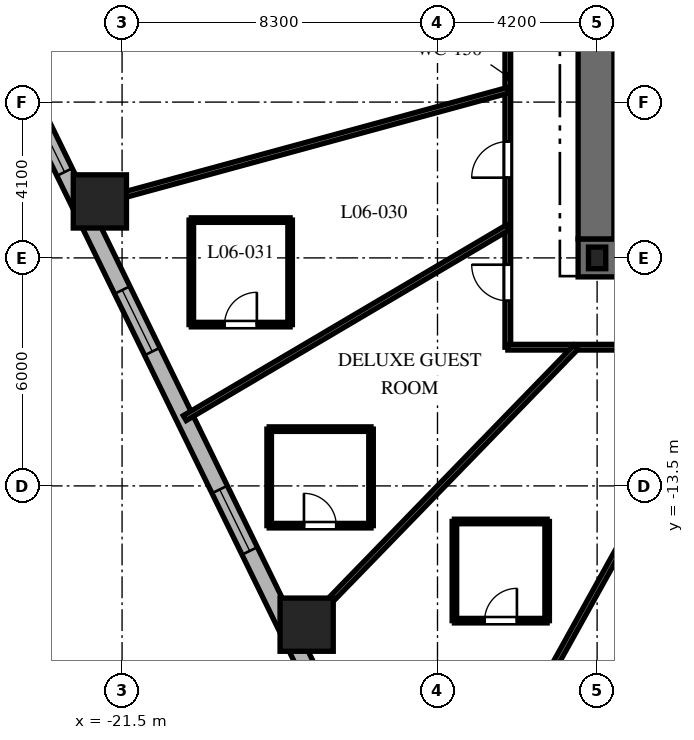
"""IFC4 building model, lengths in metres.
Left out: names, types, materials, properties, quantities, classifications, styles, units other than length and angle.
Written with IfcOpenShell. Run it as: python <this file> out.ifc"""

import sys

from ifc_helpers import new_model, si_unit, direction, frame, frame_2d, origin, origin_2d, place, context, subcontext, project, spatial, rectangle, i_section, extrude, element, fill, save


model = new_model("IFC4")
c1 = context("Model", 3, precision=1e-05, world=origin(), true_north=direction((0.0, 1.0)))
c2 = subcontext(c1, "Body", "Model", "MODEL_VIEW")
j1 = project(units=[si_unit("LENGTHUNIT", "METRE"), si_unit("PLANEANGLEUNIT", "RADIAN")], contexts=[c1])
p1 = place(None, origin())
s1 = spatial("IfcSite", under=j1, at=p1, CompositionType="ELEMENT")
p2 = place(p1, origin())
s2 = spatial("IfcBuilding", under=s1, at=p2, CompositionType="ELEMENT")
p3 = place(p2, frame((0.0, 0.0, 34.2)))
s3 = spatial("IfcBuildingStorey", under=s2, at=p3, CompositionType="ELEMENT", Elevation=34.2)
p4 = place(p3, frame((-9.5, -7.5, 0.0), z_axis=(0.0, 0.0, 1.0), x_axis=(1.0, 0.0, 0.0)))
e1 = element("IfcWall", 1, at=p4, inside=s3, PredefinedType="SHEAR", context=c2, shape_type="SweptSolid", body=[
    extrude(rectangle(XDim=19.0, YDim=1.0, at=frame_2d((9.5, 0.0))), origin(), (0.0, 0.0, 1.0), 3.7),
])
p5 = place(p4, frame((9.55, 0.0, 0.0)))
e2 = element("IfcOpeningElement", 2, at=p5, cuts=e1, PredefinedType="OPENING", context=c2, shape_type="SweptSolid", body=[
    extrude(rectangle(XDim=1.0, YDim=2.15, at=frame_2d((0.5, 1.075))), frame((0.0, 0.51, 0.0), z_axis=(0.0, -1.0, 0.0), x_axis=(1.0, 0.0, 0.0)), (0.0, 0.0, 1.0), 1.02),
])
p6 = place(p3, frame((-9.0, -7.0, 0.0), z_axis=(0.0, 0.0, 1.0), x_axis=(0.0, 1.0, 0.0)))
e3 = element("IfcWall", 3, at=p6, inside=s3, PredefinedType="SHEAR", context=c2, shape_type="SweptSolid", body=[
    extrude(rectangle(XDim=14.0, YDim=1.0, at=frame_2d((7.0, 0.0))), origin(), (0.0, 0.0, 1.0), 3.7),
])
p7 = place(p6, frame((10.125, 0.0, 0.0)))
e4 = element("IfcOpeningElement", 4, at=p7, cuts=e3, PredefinedType="OPENING", context=c2, shape_type="SweptSolid", body=[
    extrude(rectangle(XDim=1.05, YDim=2.15, at=frame_2d((0.525, 1.075))), frame((0.0, 0.51, 0.0), z_axis=(0.0, -1.0, 0.0), x_axis=(1.0, 0.0, 0.0)), (0.0, 0.0, 1.0), 1.02),
])
p8 = place(p3, frame((-8.458, -6.985, 0.0), z_axis=(0.0, 0.0, 1.0), x_axis=(0.0, 1.0, 0.0)))
e5 = element("IfcWall", 5, at=p8, inside=s3, PredefinedType="SHEAR", context=c2, shape_type="SweptSolid", body=[
    extrude(rectangle(XDim=9.143, YDim=0.2, at=frame_2d((4.572, 0.0))), origin(), (0.0, 0.0, 1.0), 3.7),
])
p9 = place(p3, frame((-9.0, -7.5, 0.0), z_axis=(0.0, 0.0, 1.0), x_axis=(1.0, 0.0, 0.0)))
e6 = element("IfcColumn", 6, at=p9, inside=s3, PredefinedType="COLUMN", context=c2, shape_type="SweptSolid", body=[
    extrude(i_section(OverallWidth=0.454, OverallDepth=0.569, WebThickness=0.078, FlangeThickness=0.125, at=origin_2d()), origin(), (0.0, 0.0, 1.0), 3.7),
])
for number, where, z_axis, x_axis in (
    (7, (-22.084, -6.014, 0.0), (0.0, 0.0, 1.0), (1.0, 0.0, 0.0)),
    (8, (-16.643, -17.152, 0.0), (0.0, 0.0, 1.0), (1.0, 0.0, 0.0)),
):
    element("IfcColumn", number, at=place(p3, frame(where, z_axis=z_axis, x_axis=x_axis)), inside=s3, PredefinedType="COLUMN", context=c2, shape_type="SweptSolid", body=[
        extrude(rectangle(XDim=1.4, YDim=1.4, at=origin_2d()), origin(), (0.0, 0.0, 1.0), 3.7),
    ])
p10 = place(p3, frame((-24.336, -2.532, 0.0), z_axis=(0.0, 0.0, 1.0), x_axis=(0.438931326393, -0.898520612291, 0.0)))
e9 = element("IfcWall", 9, at=p10, inside=s3, PredefinedType="SOLIDWALL", context=c2, shape_type="SweptSolid", body=[
    extrude(rectangle(XDim=20.623, YDim=0.45, at=frame_2d((10.312, 0.0))), origin(), (0.0, 0.0, 1.0), 3.4),
])
p11 = place(p10, frame((1.214, 0.0, 0.8)))
e10 = element("IfcOpeningElement", 10, at=p11, cuts=e9, PredefinedType="OPENING", context=c2, shape_type="SweptSolid", body=[
    extrude(rectangle(XDim=1.8, YDim=1.8, at=frame_2d((0.9, 0.9))), frame((0.0, 0.235, 0.0), z_axis=(0.0, -1.0, 0.0), x_axis=(1.0, 0.0, 0.0)), (0.0, 0.0, 1.0), 0.47),
])
p12 = place(p10, frame((6.47, 0.0, 0.8)))
e11 = element("IfcOpeningElement", 11, at=p12, cuts=e9, PredefinedType="OPENING", context=c2, shape_type="SweptSolid", body=[
    extrude(rectangle(XDim=1.8, YDim=1.8, at=frame_2d((0.9, 0.9))), frame((0.0, 0.235, 0.0), z_axis=(0.0, -1.0, 0.0), x_axis=(1.0, 0.0, 0.0)), (0.0, 0.0, 1.0), 0.47),
])
p13 = place(p10, frame((12.311, 0.0, 0.8)))
e12 = element("IfcOpeningElement", 12, at=p13, cuts=e9, PredefinedType="OPENING", context=c2, shape_type="SweptSolid", body=[
    extrude(rectangle(XDim=1.8, YDim=1.8, at=frame_2d((0.9, 0.9))), frame((0.0, 0.235, 0.0), z_axis=(0.0, -1.0, 0.0), x_axis=(1.0, 0.0, 0.0)), (0.0, 0.0, 1.0), 0.47),
])
p14 = place(p10, frame((17.66, 0.0, 0.8)))
e13 = element("IfcOpeningElement", 13, at=p14, cuts=e9, PredefinedType="OPENING", context=c2, shape_type="SweptSolid", body=[
    extrude(rectangle(XDim=1.8, YDim=1.8, at=frame_2d((0.9, 0.9))), frame((0.0, 0.235, 0.0), z_axis=(0.0, -1.0, 0.0), x_axis=(1.0, 0.0, 0.0)), (0.0, 0.0, 1.0), 0.47),
])
p15 = place(p3, frame((-11.35, -9.85, 0.0), z_axis=(0.0, 0.0, 1.0), x_axis=(0.0, 1.0, 0.0)))
e14 = element("IfcWall", 14, at=p15, inside=s3, PredefinedType="PARTITIONING", context=c2, shape_type="SweptSolid", body=[
    extrude(rectangle(XDim=19.7, YDim=0.15, at=frame_2d((9.85, 0.0))), origin(), (0.0, 0.0, 1.0), 2.84),
])
p16 = place(p15, frame((16.714, 0.0, 0.0)))
e15 = element("IfcOpeningElement", 15, at=p16, cuts=e14, PredefinedType="OPENING", context=c2, shape_type="SweptSolid", body=[
    extrude(rectangle(XDim=0.95, YDim=2.03, at=frame_2d((0.475, 1.015))), frame((0.0, 0.085, 0.0), z_axis=(0.0, -1.0, 0.0), x_axis=(1.0, 0.0, 0.0)), (0.0, 0.0, 1.0), 0.17),
])
p17 = place(p15, frame((12.932, 0.0, 0.0)))
e16 = element("IfcOpeningElement", 16, at=p17, cuts=e14, PredefinedType="OPENING", context=c2, shape_type="SweptSolid", body=[
    extrude(rectangle(XDim=0.95, YDim=2.03, at=frame_2d((0.475, 1.015))), frame((0.0, 0.085, 0.0), z_axis=(0.0, -1.0, 0.0), x_axis=(1.0, 0.0, 0.0)), (0.0, 0.0, 1.0), 0.17),
])
p18 = place(p15, frame((8.838, 0.0, 0.0)))
e17 = element("IfcOpeningElement", 17, at=p18, cuts=e14, PredefinedType="OPENING", context=c2, shape_type="SweptSolid", body=[
    extrude(rectangle(XDim=0.95, YDim=2.03, at=frame_2d((0.475, 1.015))), frame((0.0, 0.085, 0.0), z_axis=(0.0, -1.0, 0.0), x_axis=(1.0, 0.0, 0.0)), (0.0, 0.0, 1.0), 0.17),
])
p19 = place(p15, frame((4.461, 0.0, 0.0)))
e18 = element("IfcOpeningElement", 18, at=p19, cuts=e14, PredefinedType="OPENING", context=c2, shape_type="SweptSolid", body=[
    extrude(rectangle(XDim=0.95, YDim=2.03, at=frame_2d((0.475, 1.015))), frame((0.0, 0.085, 0.0), z_axis=(0.0, -1.0, 0.0), x_axis=(1.0, 0.0, 0.0)), (0.0, 0.0, 1.0), 0.17),
])
p20 = place(p15, frame((1.221, 0.0, 0.0)))
e19 = element("IfcOpeningElement", 19, at=p20, cuts=e14, PredefinedType="OPENING", context=c2, shape_type="SweptSolid", body=[
    extrude(rectangle(XDim=0.95, YDim=2.03, at=frame_2d((0.475, 1.015))), frame((0.0, 0.085, 0.0), z_axis=(0.0, -1.0, 0.0), x_axis=(1.0, 0.0, 0.0)), (0.0, 0.0, 1.0), 0.17),
])
p21 = place(p3, frame((11.35, -9.85, 0.0), z_axis=(0.0, 0.0, 1.0), x_axis=(-1.0, 0.0, 0.0)))
e20 = element("IfcWall", 20, at=p21, inside=s3, PredefinedType="PARTITIONING", context=c2, shape_type="SweptSolid", body=[
    extrude(rectangle(XDim=22.7, YDim=0.15, at=frame_2d((11.35, 0.0))), origin(), (0.0, 0.0, 1.0), 2.84),
])
p22 = place(p21, frame((18.436, 0.0, 0.0)))
e21 = element("IfcOpeningElement", 21, at=p22, cuts=e20, PredefinedType="OPENING", context=c2, shape_type="SweptSolid", body=[
    extrude(rectangle(XDim=0.95, YDim=2.03, at=frame_2d((0.475, 1.015))), frame((0.0, 0.085, 0.0), z_axis=(0.0, -1.0, 0.0), x_axis=(1.0, 0.0, 0.0)), (0.0, 0.0, 1.0), 0.17),
])
p23 = place(p21, frame((15.176, 0.0, 0.0)))
e22 = element("IfcOpeningElement", 22, at=p23, cuts=e20, PredefinedType="OPENING", context=c2, shape_type="SweptSolid", body=[
    extrude(rectangle(XDim=0.9, YDim=2.03, at=frame_2d((0.45, 1.015))), frame((0.0, 0.085, 0.0), z_axis=(0.0, -1.0, 0.0), x_axis=(1.0, 0.0, 0.0)), (0.0, 0.0, 1.0), 0.17),
])
p24 = place(p21, frame((12.415, 0.0, 0.0)))
e23 = element("IfcOpeningElement", 23, at=p24, cuts=e20, PredefinedType="OPENING", context=c2, shape_type="SweptSolid", body=[
    extrude(rectangle(XDim=0.95, YDim=2.03, at=frame_2d((0.475, 1.015))), frame((0.0, 0.085, 0.0), z_axis=(0.0, -1.0, 0.0), x_axis=(1.0, 0.0, 0.0)), (0.0, 0.0, 1.0), 0.17),
])
p25 = place(p21, frame((8.925, 0.0, 0.0)))
e24 = element("IfcOpeningElement", 24, at=p25, cuts=e20, PredefinedType="OPENING", context=c2, shape_type="SweptSolid", body=[
    extrude(rectangle(XDim=0.95, YDim=2.03, at=frame_2d((0.475, 1.015))), frame((0.0, 0.085, 0.0), z_axis=(0.0, -1.0, 0.0), x_axis=(1.0, 0.0, 0.0)), (0.0, 0.0, 1.0), 0.17),
])
p26 = place(p21, frame((5.463, 0.0, 0.0)))
e25 = element("IfcOpeningElement", 25, at=p26, cuts=e20, PredefinedType="OPENING", context=c2, shape_type="SweptSolid", body=[
    extrude(rectangle(XDim=0.95, YDim=2.03, at=frame_2d((0.475, 1.015))), frame((0.0, 0.085, 0.0), z_axis=(0.0, -1.0, 0.0), x_axis=(1.0, 0.0, 0.0)), (0.0, 0.0, 1.0), 0.17),
])
p27 = place(p21, frame((1.91, 0.0, 0.0)))
e26 = element("IfcOpeningElement", 26, at=p27, cuts=e20, PredefinedType="OPENING", context=c2, shape_type="SweptSolid", body=[
    extrude(rectangle(XDim=0.9, YDim=2.03, at=frame_2d((0.45, 1.015))), frame((0.0, 0.085, 0.0), z_axis=(0.0, -1.0, 0.0), x_axis=(1.0, 0.0, 0.0)), (0.0, 0.0, 1.0), 0.17),
])
p28 = place(p3, frame((-11.35, -3.091, 0.0), z_axis=(0.0, 0.0, 1.0), x_axis=(-0.964859685283, -0.262765651704, 0.0)))
e27 = element("IfcWall", 27, at=p28, inside=s3, PredefinedType="PARTITIONING", context=c2, shape_type="SweptSolid", body=[
    extrude(rectangle(XDim=11.629, YDim=0.15, at=frame_2d((5.814, 0.0))), origin(), (0.0, 0.0, 1.0), 2.54),
])
p29 = place(p3, frame((-11.35, -6.698, 0.0), z_axis=(0.0, 0.0, 1.0), x_axis=(-0.861198232886, -0.508269223614, 0.0)))
e28 = element("IfcWall", 28, at=p29, inside=s3, PredefinedType="PARTITIONING", context=c2, shape_type="SweptSolid", body=[
    extrude(rectangle(XDim=9.87, YDim=0.15, at=frame_2d((4.935, 0.0))), origin(), (0.0, 0.0, 1.0), 2.54),
])
p30 = place(p3, frame((-9.558, -9.85, 0.0), z_axis=(0.0, 0.0, 1.0), x_axis=(-0.69638346089, -0.717669893056, 0.0)))
e29 = element("IfcWall", 29, at=p30, inside=s3, PredefinedType="PARTITIONING", context=c2, shape_type="SweptSolid", body=[
    extrude(rectangle(XDim=10.701, YDim=0.15, at=frame_2d((5.351, 0.0))), origin(), (0.0, 0.0, 1.0), 2.54),
])
p31 = place(p3, frame((-5.471, -9.85, 0.0), z_axis=(0.0, 0.0, 1.0), x_axis=(-0.48553323157, -0.874218211341, 0.0)))
e30 = element("IfcWall", 30, at=p31, inside=s3, PredefinedType="PARTITIONING", context=c2, shape_type="SweptSolid", body=[
    extrude(rectangle(XDim=14.74, YDim=0.15, at=frame_2d((7.37, 0.0))), origin(), (0.0, 0.0, 1.0), 2.54),
])
p32 = place(p3, frame((-19.678, -9.255, 0.0), z_axis=(0.0, 0.0, 1.0), x_axis=(1.0, 0.0, 0.0)))
e31 = element("IfcWall", 31, at=p32, inside=s3, PredefinedType="PARTITIONING", context=c2, shape_type="SweptSolid", body=[
    extrude(rectangle(XDim=2.6, YDim=0.12, at=frame_2d((1.3, 0.0))), origin(), (0.0, 0.0, 1.0), 3.4),
])
p33 = place(p32, frame((0.875, 0.0, 0.0)))
e32 = element("IfcOpeningElement", 32, at=p33, cuts=e31, PredefinedType="OPENING", context=c2, shape_type="SweptSolid", body=[
    extrude(rectangle(XDim=0.85, YDim=2.03, at=frame_2d((0.425, 1.015))), frame((0.0, 0.07, 0.0), z_axis=(0.0, -1.0, 0.0), x_axis=(1.0, 0.0, 0.0)), (0.0, 0.0, 1.0), 0.14),
])
p34 = place(p3, frame((-17.078, -9.255, 0.0), z_axis=(0.0, 0.0, 1.0), x_axis=(0.0, 1.0, 0.0)))
e33 = element("IfcWall", 33, at=p34, inside=s3, PredefinedType="PARTITIONING", context=c2, shape_type="SweptSolid", body=[
    extrude(rectangle(XDim=2.75, YDim=0.12, at=frame_2d((1.375, 0.0))), origin(), (0.0, 0.0, 1.0), 2.84),
])
p35 = place(p3, frame((-17.078, -6.505, 0.0), z_axis=(0.0, 0.0, 1.0), x_axis=(-1.0, 0.0, 0.0)))
e34 = element("IfcWall", 34, at=p35, inside=s3, PredefinedType="PARTITIONING", context=c2, shape_type="SweptSolid", body=[
    extrude(rectangle(XDim=2.6, YDim=0.12, at=frame_2d((1.3, 0.0))), origin(), (0.0, 0.0, 1.0), 2.84),
])
p36 = place(p3, frame((-19.678, -6.505, 0.0), z_axis=(0.0, 0.0, 1.0), x_axis=(0.0, -1.0, 0.0)))
e35 = element("IfcWall", 35, at=p36, inside=s3, PredefinedType="PARTITIONING", context=c2, shape_type="SweptSolid", body=[
    extrude(rectangle(XDim=2.75, YDim=0.12, at=frame_2d((1.375, 0.0))), origin(), (0.0, 0.0, 1.0), 3.4),
])
p37 = place(p3, frame((-17.629, -14.546, 0.0), z_axis=(0.0, 0.0, 1.0), x_axis=(1.0, 0.0, 0.0)))
e36 = element("IfcWall", 36, at=p37, inside=s3, PredefinedType="PARTITIONING", context=c2, shape_type="SweptSolid", body=[
    extrude(rectangle(XDim=2.68, YDim=0.12, at=frame_2d((1.34, 0.0))), origin(), (0.0, 0.0, 1.0), 3.4),
])
p38 = place(p37, frame((0.915, 0.0, 0.0)))
e37 = element("IfcOpeningElement", 37, at=p38, cuts=e36, PredefinedType="OPENING", context=c2, shape_type="SweptSolid", body=[
    extrude(rectangle(XDim=0.85, YDim=2.03, at=frame_2d((0.425, 1.015))), frame((0.0, 0.07, 0.0), z_axis=(0.0, -1.0, 0.0), x_axis=(1.0, 0.0, 0.0)), (0.0, 0.0, 1.0), 0.14),
])
p39 = place(p3, frame((-14.949, -14.546, 0.0), z_axis=(0.0, 0.0, 1.0), x_axis=(0.0, 1.0, 0.0)))
e38 = element("IfcWall", 38, at=p39, inside=s3, PredefinedType="PARTITIONING", context=c2, shape_type="SweptSolid", body=[
    extrude(rectangle(XDim=2.54, YDim=0.12, at=frame_2d((1.27, 0.0))), origin(), (0.0, 0.0, 1.0), 2.927),
])
p40 = place(p3, frame((-14.949, -12.006, 0.0), z_axis=(0.0, 0.0, 1.0), x_axis=(-1.0, 0.0, 0.0)))
e39 = element("IfcWall", 39, at=p40, inside=s3, PredefinedType="PARTITIONING", context=c2, shape_type="SweptSolid", body=[
    extrude(rectangle(XDim=2.68, YDim=0.12, at=frame_2d((1.34, 0.0))), origin(), (0.0, 0.0, 1.0), 2.927),
])
p41 = place(p3, frame((-17.629, -12.006, 0.0), z_axis=(0.0, 0.0, 1.0), x_axis=(0.0, -1.0, 0.0)))
e40 = element("IfcWall", 40, at=p41, inside=s3, PredefinedType="PARTITIONING", context=c2, shape_type="SweptSolid", body=[
    extrude(rectangle(XDim=2.54, YDim=0.12, at=frame_2d((1.27, 0.0))), origin(), (0.0, 0.0, 1.0), 2.54),
])
p42 = place(p3, frame((-12.755, -17.046, 0.0), z_axis=(0.0, 0.0, 1.0), x_axis=(1.0, 0.0, 0.0)))
e41 = element("IfcWall", 41, at=p42, inside=s3, PredefinedType="PARTITIONING", context=c2, shape_type="SweptSolid", body=[
    extrude(rectangle(XDim=2.44, YDim=0.12, at=frame_2d((1.22, 0.0))), origin(), (0.0, 0.0, 1.0), 3.4),
])
p43 = place(p42, frame((0.795, 0.0, 0.0)))
e42 = element("IfcOpeningElement", 42, at=p43, cuts=e41, PredefinedType="OPENING", context=c2, shape_type="SweptSolid", body=[
    extrude(rectangle(XDim=0.85, YDim=2.03, at=frame_2d((0.425, 1.015))), frame((0.0, 0.07, 0.0), z_axis=(0.0, -1.0, 0.0), x_axis=(1.0, 0.0, 0.0)), (0.0, 0.0, 1.0), 0.14),
])
p44 = place(p3, frame((-10.315, -17.046, 0.0), z_axis=(0.0, 0.0, 1.0), x_axis=(0.0, 1.0, 0.0)))
e43 = element("IfcWall", 43, at=p44, inside=s3, PredefinedType="PARTITIONING", context=c2, shape_type="SweptSolid", body=[
    extrude(rectangle(XDim=2.61, YDim=0.12, at=frame_2d((1.305, 0.0))), origin(), (0.0, 0.0, 1.0), 2.972),
])
p45 = place(p3, frame((-10.315, -14.436, 0.0), z_axis=(0.0, 0.0, 1.0), x_axis=(-1.0, 0.0, 0.0)))
e44 = element("IfcWall", 44, at=p45, inside=s3, PredefinedType="PARTITIONING", context=c2, shape_type="SweptSolid", body=[
    extrude(rectangle(XDim=2.44, YDim=0.12, at=frame_2d((1.22, 0.0))), origin(), (0.0, 0.0, 1.0), 3.4),
])
p46 = place(p3, frame((-12.755, -14.436, 0.0), z_axis=(0.0, 0.0, 1.0), x_axis=(0.0, -1.0, 0.0)))
e45 = element("IfcWall", 45, at=p46, inside=s3, PredefinedType="PARTITIONING", context=c2, shape_type="SweptSolid", body=[
    extrude(rectangle(XDim=2.61, YDim=0.12, at=frame_2d((1.305, 0.0))), origin(), (0.0, 0.0, 1.0), 2.972),
])
p47 = place(p11, origin())
e46 = element("IfcWindow", 46, at=p47, inside=s3, PartitioningType="SINGLE_PANEL", PredefinedType="WINDOW", context=c2, shape_type="SweptSolid", body=[
    extrude(rectangle(XDim=1.8, YDim=1.8, at=frame_2d((0.9, 0.9))), frame((0.0, 0.03, 0.0), z_axis=(0.0, -1.0, 0.0), x_axis=(1.0, 0.0, 0.0)), (0.0, 0.0, 1.0), 0.06),
])
fill(e10, e46)
p48 = place(p12, origin())
e47 = element("IfcWindow", 47, at=p48, inside=s3, PartitioningType="SINGLE_PANEL", PredefinedType="WINDOW", context=c2, shape_type="SweptSolid", body=[
    extrude(rectangle(XDim=1.8, YDim=1.8, at=frame_2d((0.9, 0.9))), frame((0.0, 0.03, 0.0), z_axis=(0.0, -1.0, 0.0), x_axis=(1.0, 0.0, 0.0)), (0.0, 0.0, 1.0), 0.06),
])
fill(e11, e47)
p49 = place(p13, origin())
e48 = element("IfcWindow", 48, at=p49, inside=s3, PartitioningType="SINGLE_PANEL", PredefinedType="WINDOW", context=c2, shape_type="SweptSolid", body=[
    extrude(rectangle(XDim=1.8, YDim=1.8, at=frame_2d((0.9, 0.9))), frame((0.0, 0.03, 0.0), z_axis=(0.0, -1.0, 0.0), x_axis=(1.0, 0.0, 0.0)), (0.0, 0.0, 1.0), 0.06),
])
fill(e12, e48)
p50 = place(p19, origin())
e49 = element("IfcDoor", 49, at=p50, inside=s3, OperationType="SINGLE_SWING_LEFT", PredefinedType="DOOR", context=c2, shape_type="SweptSolid", body=[
    extrude(rectangle(XDim=0.95, YDim=2.03, at=frame_2d((0.475, 1.015))), frame((0.0, 0.025, 0.0), z_axis=(0.0, -1.0, 0.0), x_axis=(1.0, 0.0, 0.0)), (0.0, 0.0, 1.0), 0.05),
])
fill(e18, e49)
p51 = place(p33, origin())
e50 = element("IfcDoor", 50, at=p51, inside=s3, OperationType="SINGLE_SWING_RIGHT", PredefinedType="DOOR", context=c2, shape_type="SweptSolid", body=[
    extrude(rectangle(XDim=0.85, YDim=2.03, at=frame_2d((0.425, 1.015))), frame((0.0, 0.025, 0.0), z_axis=(0.0, -1.0, 0.0), x_axis=(1.0, 0.0, 0.0)), (0.0, 0.0, 1.0), 0.05),
])
fill(e32, e50)
p52 = place(p20, origin())
e51 = element("IfcDoor", 51, at=p52, inside=s3, OperationType="SINGLE_SWING_RIGHT", PredefinedType="DOOR", context=c2, shape_type="SweptSolid", body=[
    extrude(rectangle(XDim=0.95, YDim=2.03, at=frame_2d((0.475, 1.015))), frame((0.0, 0.025, 0.0), z_axis=(0.0, -1.0, 0.0), x_axis=(1.0, 0.0, 0.0)), (0.0, 0.0, 1.0), 0.05),
])
fill(e19, e51)
p53 = place(p38, origin())
e52 = element("IfcDoor", 52, at=p53, inside=s3, OperationType="SINGLE_SWING_LEFT", PredefinedType="DOOR", context=c2, shape_type="SweptSolid", body=[
    extrude(rectangle(XDim=0.85, YDim=2.03, at=frame_2d((0.425, 1.015))), frame((0.0, 0.025, 0.0), z_axis=(0.0, -1.0, 0.0), x_axis=(1.0, 0.0, 0.0)), (0.0, 0.0, 1.0), 0.05),
])
fill(e37, e52)
p54 = place(p43, origin())
e53 = element("IfcDoor", 53, at=p54, inside=s3, OperationType="SINGLE_SWING_RIGHT", PredefinedType="DOOR", context=c2, shape_type="SweptSolid", body=[
    extrude(rectangle(XDim=0.85, YDim=2.03, at=frame_2d((0.425, 1.015))), frame((0.0, 0.025, 0.0), z_axis=(0.0, -1.0, 0.0), x_axis=(1.0, 0.0, 0.0)), (0.0, 0.0, 1.0), 0.05),
])
fill(e42, e53)
save(model, sys.argv[1])
